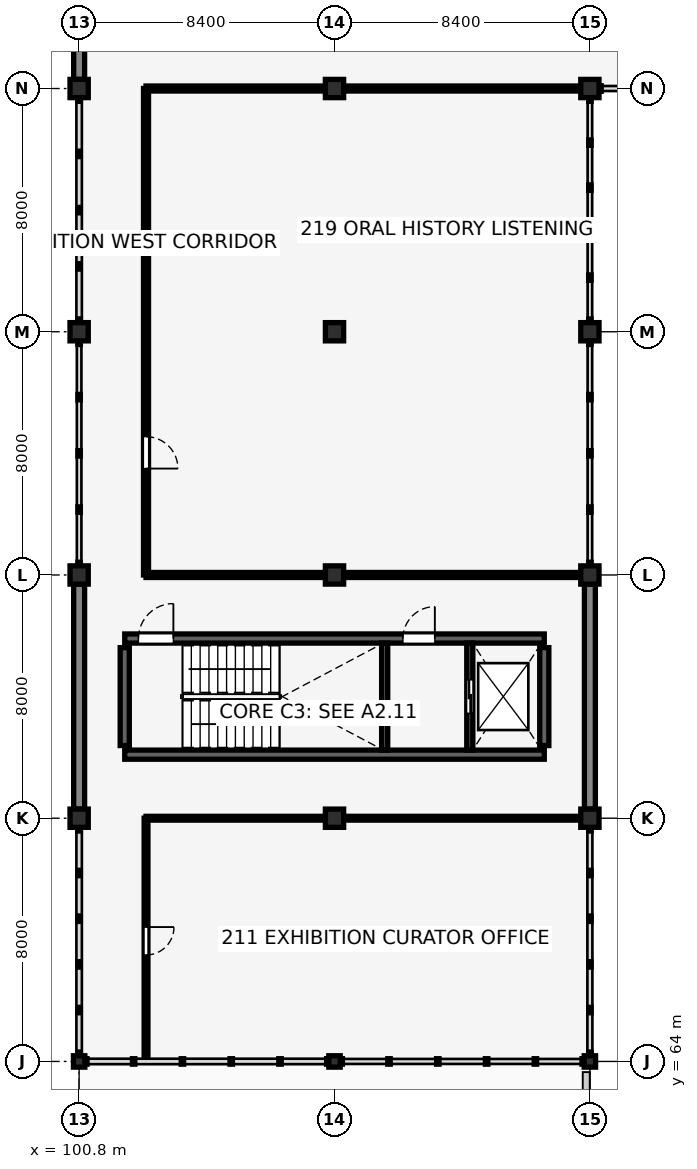
"""IFC4 building model, lengths in metres.
Left out: names, types, materials, properties, quantities, classifications, styles, units other than length and angle.
Written with IfcOpenShell. Run it as: python <this file> out.ifc"""

import sys

from ifc_helpers import new_model, si_unit, direction, frame, frame_2d, origin, origin_2d, place, context, subcontext, project, spatial, rectangle, i_section, extrude, element, fill, save


model = new_model("IFC4")
c1 = context("Model", 3, precision=1e-05, world=origin(), true_north=direction((0.0, 1.0)))
c2 = subcontext(c1, "Body", "Model", "MODEL_VIEW")
j1 = project(units=[si_unit("LENGTHUNIT", "METRE"), si_unit("PLANEANGLEUNIT", "RADIAN")], contexts=[c1])
p1 = place(None, origin())
s1 = spatial("IfcSite", under=j1, at=p1, CompositionType="ELEMENT")
p2 = place(p1, origin())
s2 = spatial("IfcBuilding", under=s1, at=p2, CompositionType="ELEMENT")
p3 = place(p2, frame((0.0, 0.0, 9.52)))
s3 = spatial("IfcBuildingStorey", under=s2, at=p3, CompositionType="ELEMENT", Elevation=9.52)
p4 = place(p3, frame((102.3, 74.09, 0.0), z_axis=(0.0, 0.0, 1.0), x_axis=(1.0, 0.0, 0.0)))
e1 = element("IfcWall", 1, at=p4, inside=s3, PredefinedType="SHEAR", context=c2, shape_type="SweptSolid", body=[
    extrude(rectangle(XDim=13.8, YDim=0.3, at=frame_2d((6.9, 0.0))), origin(), (0.0, 0.0, 1.0), 3.57),
])
p5 = place(p3, frame((102.3, 77.91, 0.0), z_axis=(0.0, 0.0, 1.0), x_axis=(1.0, 0.0, 0.0)))
e2 = element("IfcWall", 2, at=p5, inside=s3, PredefinedType="SHEAR", context=c2, shape_type="SweptSolid", body=[
    extrude(rectangle(XDim=13.8, YDim=0.3, at=frame_2d((6.9, 0.0))), origin(), (0.0, 0.0, 1.0), 3.57),
])
p6 = place(p5, frame((0.45, 0.0, 0.0), z_axis=(0.0, 0.0, 1.0), x_axis=(1.0, 0.0, 0.0)))
e3 = element("IfcOpeningElement", 3, at=p6, cuts=e2, PredefinedType="OPENING", context=c2, shape_type="SweptSolid", body=[
    extrude(rectangle(XDim=1.15, YDim=2.15, at=frame_2d((0.575, 1.075))), frame((0.0, 0.16, 0.0), z_axis=(0.0, -1.0, 0.0), x_axis=(1.0, 0.0, 0.0)), (0.0, 0.0, 1.0), 0.32),
])
p7 = place(p5, frame((9.15, 0.0, 0.0), z_axis=(0.0, 0.0, 1.0), x_axis=(1.0, 0.0, 0.0)))
e4 = element("IfcOpeningElement", 4, at=p7, cuts=e2, PredefinedType="OPENING", context=c2, shape_type="SweptSolid", body=[
    extrude(rectangle(XDim=1.05, YDim=2.15, at=frame_2d((0.525, 1.075))), frame((0.0, 0.16, 0.0), z_axis=(0.0, -1.0, 0.0), x_axis=(1.0, 0.0, 0.0)), (0.0, 0.0, 1.0), 0.32),
])
for number, where, z_axis, x_axis in (
    (5, (102.3, 74.39, 0.0), (0.0, 0.0, 1.0), (0.0, 1.0, 0.0)),
    (6, (116.1, 74.39, 0.0), (0.0, 0.0, 1.0), (0.0, 1.0, 0.0)),
):
    element("IfcWall", number, at=place(p3, frame(where, z_axis=z_axis, x_axis=x_axis)), inside=s3, PredefinedType="SHEAR", context=c2, shape_type="SweptSolid", body=[
        extrude(rectangle(XDim=3.22, YDim=0.3, at=frame_2d((1.61, 0.0))), origin(), (0.0, 0.0, 1.0), 3.57),
    ])
p8 = place(p3, frame((100.8, 64.0, 0.0), z_axis=(0.0, 0.0, 1.0), x_axis=(1.0, 0.0, 0.0)))
e7 = element("IfcColumn", 7, at=p8, inside=s3, PredefinedType="COLUMN", context=c2, shape_type="SweptSolid", body=[
    extrude(i_section(OverallWidth=0.375, OverallDepth=0.375, WebThickness=0.017, FlangeThickness=0.027, FilletRadius=0.015, at=origin_2d()), origin(), (0.0, 0.0, 1.0), 3.57),
])
for number, where, z_axis, x_axis in (
    (8, (100.8, 72.0, 0.0), (0.0, 0.0, 1.0), (1.0, 0.0, 0.0)),
    (9, (100.8, 80.0, 0.0), (0.0, 0.0, 1.0), (1.0, 0.0, 0.0)),
    (10, (100.8, 88.0, 0.0), (0.0, 0.0, 1.0), (1.0, 0.0, 0.0)),
    (11, (100.8, 96.0, 0.0), (0.0, 0.0, 1.0), (1.0, 0.0, 0.0)),
):
    element("IfcColumn", number, at=place(p3, frame(where, z_axis=z_axis, x_axis=x_axis)), inside=s3, PredefinedType="COLUMN", context=c2, shape_type="SweptSolid", body=[
        extrude(rectangle(XDim=0.6, YDim=0.6, at=origin_2d()), origin(), (0.0, 0.0, 1.0), 3.57),
    ])
p9 = place(p3, frame((109.2, 64.0, 0.0), z_axis=(0.0, 0.0, 1.0), x_axis=(1.0, 0.0, 0.0)))
e12 = element("IfcColumn", 12, at=p9, inside=s3, PredefinedType="COLUMN", context=c2, shape_type="SweptSolid", body=[
    extrude(i_section(OverallWidth=0.375, OverallDepth=0.375, WebThickness=0.017, FlangeThickness=0.027, FilletRadius=0.015, at=origin_2d()), origin(), (0.0, 0.0, 1.0), 3.57),
])
for number, where, z_axis, x_axis in (
    (13, (109.2, 72.0, 0.0), (0.0, 0.0, 1.0), (1.0, 0.0, 0.0)),
    (14, (109.2, 80.0, 0.0), (0.0, 0.0, 1.0), (1.0, 0.0, 0.0)),
    (15, (109.2, 88.0, 0.0), (0.0, 0.0, 1.0), (1.0, 0.0, 0.0)),
    (16, (109.2, 96.0, 0.0), (0.0, 0.0, 1.0), (1.0, 0.0, 0.0)),
):
    element("IfcColumn", number, at=place(p3, frame(where, z_axis=z_axis, x_axis=x_axis)), inside=s3, PredefinedType="COLUMN", context=c2, shape_type="SweptSolid", body=[
        extrude(rectangle(XDim=0.6, YDim=0.6, at=origin_2d()), origin(), (0.0, 0.0, 1.0), 3.57),
    ])
p10 = place(p3, frame((117.6, 64.0, 0.0), z_axis=(0.0, 0.0, 1.0), x_axis=(1.0, 0.0, 0.0)))
e17 = element("IfcColumn", 17, at=p10, inside=s3, PredefinedType="COLUMN", context=c2, shape_type="SweptSolid", body=[
    extrude(i_section(OverallWidth=0.375, OverallDepth=0.375, WebThickness=0.017, FlangeThickness=0.027, FilletRadius=0.015, at=origin_2d()), origin(), (0.0, 0.0, 1.0), 3.57),
])
for number, where, z_axis, x_axis in (
    (18, (117.6, 72.0, 0.0), (0.0, 0.0, 1.0), (1.0, 0.0, 0.0)),
    (19, (117.6, 80.0, 0.0), (0.0, 0.0, 1.0), (1.0, 0.0, 0.0)),
    (20, (117.6, 88.0, 0.0), (0.0, 0.0, 1.0), (1.0, 0.0, 0.0)),
    (21, (117.6, 96.0, 0.0), (0.0, 0.0, 1.0), (1.0, 0.0, 0.0)),
):
    element("IfcColumn", number, at=place(p3, frame(where, z_axis=z_axis, x_axis=x_axis)), inside=s3, PredefinedType="COLUMN", context=c2, shape_type="SweptSolid", body=[
        extrude(rectangle(XDim=0.6, YDim=0.6, at=origin_2d()), origin(), (0.0, 0.0, 1.0), 3.57),
    ])
for number, where, z_axis, x_axis in (
    (22, (117.6, 72.3, 0.0), (0.0, 0.0, 1.0), (0.0, 1.0, 0.0)),
    (23, (100.8, 72.3, 0.0), (0.0, 0.0, 1.0), (0.0, 1.0, 0.0)),
):
    element("IfcWall", number, at=place(p3, frame(where, z_axis=z_axis, x_axis=x_axis)), inside=s3, PredefinedType="SOLIDWALL", context=c2, shape_type="SweptSolid", body=[
        extrude(rectangle(XDim=7.4, YDim=0.36, at=frame_2d((3.7, 0.0))), origin(), (0.0, 0.0, 1.0), 3.27),
    ])
p11 = place(p3, frame((100.8, 96.3, 0.0), z_axis=(0.0, 0.0, 1.0), x_axis=(0.0, 1.0, 0.0)))
e24 = element("IfcWall", 24, at=p11, inside=s3, PredefinedType="SOLIDWALL", context=c2, shape_type="SweptSolid", body=[
    extrude(rectangle(XDim=7.513, YDim=0.36, at=frame_2d((3.756, 0.0))), origin(), (0.0, 0.0, 1.0), 3.219),
])
p12 = place(p11, frame((2.756, 0.0, 0.9), z_axis=(0.0, 0.0, 1.0), x_axis=(1.0, 0.0, 0.0)))
e25 = element("IfcOpeningElement", 25, at=p12, cuts=e24, PredefinedType="OPENING", context=c2, shape_type="SweptSolid", body=[
    extrude(rectangle(XDim=2.0, YDim=1.5, at=frame_2d((1.0, 0.75))), frame((0.0, 0.19, 0.0), z_axis=(0.0, -1.0, 0.0), x_axis=(1.0, 0.0, 0.0)), (0.0, 0.0, 1.0), 0.38),
])
p13 = place(p3, frame((117.48, 63.65, 0.0), z_axis=(0.0, 0.0, 1.0), x_axis=(0.0, -1.0, 0.0)))
e26 = element("IfcWall", 26, at=p13, inside=s3, PredefinedType="PARAPET", context=c2, shape_type="SweptSolid", body=[
    extrude(rectangle(XDim=7.65, YDim=0.23, at=frame_2d((3.825, 0.0))), origin(), (0.0, 0.0, 1.0), 1.05),
])
p14 = place(p3, frame((110.85, 74.24, 0.0), z_axis=(0.0, 0.0, 1.0), x_axis=(0.0, 1.0, 0.0)))
e27 = element("IfcWall", 27, at=p14, inside=s3, PredefinedType="SHEAR", context=c2, shape_type="SweptSolid", body=[
    extrude(rectangle(XDim=3.52, YDim=0.2, at=frame_2d((1.76, 0.0))), origin(), (0.0, 0.0, 1.0), 3.57),
])
p15 = place(p3, frame((113.65, 74.24, 0.0), z_axis=(0.0, 0.0, 1.0), x_axis=(0.0, 1.0, 0.0)))
e28 = element("IfcWall", 28, at=p15, inside=s3, PredefinedType="SHEAR", context=c2, shape_type="SweptSolid", body=[
    extrude(rectangle(XDim=3.52, YDim=0.2, at=frame_2d((1.76, 0.0))), origin(), (0.0, 0.0, 1.0), 3.57),
])
p16 = place(p15, frame((1.21, 0.0, 0.0), z_axis=(0.0, 0.0, 1.0), x_axis=(1.0, 0.0, 0.0)))
e29 = element("IfcOpeningElement", 29, at=p16, cuts=e28, PredefinedType="OPENING", context=c2, shape_type="SweptSolid", body=[
    extrude(rectangle(XDim=1.1, YDim=2.15, at=frame_2d((0.55, 1.075))), frame((0.0, 0.11, 0.0), z_axis=(0.0, -1.0, 0.0), x_axis=(1.0, 0.0, 0.0)), (0.0, 0.0, 1.0), 0.22),
])
p17 = place(p3, frame((103.0, 64.04, 0.0), z_axis=(0.0, 0.0, 1.0), x_axis=(0.0, 1.0, 0.0)))
e30 = element("IfcWall", 30, at=p17, inside=s3, PredefinedType="PARTITIONING", context=c2, shape_type="SweptSolid", body=[
    extrude(rectangle(XDim=7.96, YDim=0.125, at=frame_2d((3.98, 0.0))), origin(), (0.0, 0.0, 1.0), 3.57),
])
p18 = place(p17, frame((4.38, 0.0, 0.0), z_axis=(0.0, 0.0, 1.0), x_axis=(-1.0, 0.0, 0.0)))
e31 = element("IfcOpeningElement", 31, at=p18, cuts=e30, PredefinedType="OPENING", context=c2, shape_type="SweptSolid", body=[
    extrude(rectangle(XDim=0.92, YDim=2.12, at=frame_2d((0.46, 1.06))), frame((0.0, 0.073, 0.0), z_axis=(0.0, -1.0, 0.0), x_axis=(1.0, 0.0, 0.0)), (0.0, 0.0, 1.0), 0.145),
])
p19 = place(p3, frame((103.0, 80.0, 0.0), z_axis=(0.0, 0.0, 1.0), x_axis=(0.0, 1.0, 0.0)))
e32 = element("IfcWall", 32, at=p19, inside=s3, PredefinedType="PARTITIONING", context=c2, shape_type="SweptSolid", body=[
    extrude(rectangle(XDim=16.0, YDim=0.165, at=frame_2d((8.0, 0.0))), origin(), (0.0, 0.0, 1.0), 3.57),
])
p20 = place(p19, frame((4.55, 0.0, 0.0), z_axis=(0.0, 0.0, 1.0), x_axis=(-1.0, 0.0, 0.0)))
e33 = element("IfcOpeningElement", 33, at=p20, cuts=e32, PredefinedType="OPENING", context=c2, shape_type="SweptSolid", body=[
    extrude(rectangle(XDim=1.05, YDim=2.15, at=frame_2d((0.525, 1.075))), frame((0.0, 0.093, 0.0), z_axis=(0.0, -1.0, 0.0), x_axis=(1.0, 0.0, 0.0)), (0.0, 0.0, 1.0), 0.185),
])
p21 = place(p3, frame((103.0, 72.0, 0.0), z_axis=(0.0, 0.0, 1.0), x_axis=(1.0, 0.0, 0.0)))
e34 = element("IfcWall", 34, at=p21, inside=s3, PredefinedType="PARTITIONING", context=c2, shape_type="SweptSolid", body=[
    extrude(rectangle(XDim=5.91, YDim=0.125, at=frame_2d((2.955, 0.0))), origin(), (0.0, 0.0, 1.0), 3.037),
])
p22 = place(p3, frame((109.49, 72.0, 0.0), z_axis=(0.0, 0.0, 1.0), x_axis=(1.0, 0.0, 0.0)))
e35 = element("IfcWall", 35, at=p22, inside=s3, PredefinedType="PARTITIONING", context=c2, shape_type="SweptSolid", body=[
    extrude(rectangle(XDim=7.82, YDim=0.125, at=frame_2d((3.91, 0.0))), origin(), (0.0, 0.0, 1.0), 3.037),
])
p23 = place(p3, frame((103.0, 80.0, 0.0), z_axis=(0.0, 0.0, 1.0), x_axis=(1.0, 0.0, 0.0)))
e36 = element("IfcWall", 36, at=p23, inside=s3, PredefinedType="PARTITIONING", context=c2, shape_type="SweptSolid", body=[
    extrude(rectangle(XDim=5.91, YDim=0.165, at=frame_2d((2.955, 0.0))), origin(), (0.0, 0.0, 1.0), 3.037),
])
p24 = place(p3, frame((109.49, 80.0, 0.0), z_axis=(0.0, 0.0, 1.0), x_axis=(1.0, 0.0, 0.0)))
e37 = element("IfcWall", 37, at=p24, inside=s3, PredefinedType="PARTITIONING", context=c2, shape_type="SweptSolid", body=[
    extrude(rectangle(XDim=7.82, YDim=0.165, at=frame_2d((3.91, 0.0))), origin(), (0.0, 0.0, 1.0), 3.037),
])
p25 = place(p3, frame((103.0, 96.0, 0.0), z_axis=(0.0, 0.0, 1.0), x_axis=(1.0, 0.0, 0.0)))
e38 = element("IfcWall", 38, at=p25, inside=s3, PredefinedType="PARTITIONING", context=c2, shape_type="SweptSolid", body=[
    extrude(rectangle(XDim=5.91, YDim=0.165, at=frame_2d((2.955, 0.0))), origin(), (0.0, 0.0, 1.0), 3.037),
])
p26 = place(p3, frame((109.49, 96.0, 0.0), z_axis=(0.0, 0.0, 1.0), x_axis=(1.0, 0.0, 0.0)))
e39 = element("IfcWall", 39, at=p26, inside=s3, PredefinedType="PARTITIONING", context=c2, shape_type="SweptSolid", body=[
    extrude(rectangle(XDim=7.82, YDim=0.165, at=frame_2d((3.91, 0.0))), origin(), (0.0, 0.0, 1.0), 3.037),
])
p27 = place(p6, origin())
e40 = element("IfcDoor", 40, at=p27, inside=s3, OperationType="SINGLE_SWING_RIGHT", PredefinedType="DOOR", context=c2, shape_type="SweptSolid", body=[
    extrude(rectangle(XDim=1.15, YDim=2.15, at=frame_2d((0.575, 1.075))), frame((0.0, 0.025, 0.0), z_axis=(0.0, -1.0, 0.0), x_axis=(1.0, 0.0, 0.0)), (0.0, 0.0, 1.0), 0.05),
])
fill(e3, e40)
p28 = place(p7, origin())
e41 = element("IfcDoor", 41, at=p28, inside=s3, OperationType="SINGLE_SWING_RIGHT", PredefinedType="DOOR", context=c2, shape_type="SweptSolid", body=[
    extrude(rectangle(XDim=1.05, YDim=2.15, at=frame_2d((0.525, 1.075))), frame((0.0, 0.025, 0.0), z_axis=(0.0, -1.0, 0.0), x_axis=(1.0, 0.0, 0.0)), (0.0, 0.0, 1.0), 0.05),
])
fill(e4, e41)
p29 = place(p16, origin())
e42 = element("IfcDoor", 42, at=p29, inside=s3, OperationType="DOUBLE_DOOR_SLIDING", PredefinedType="DOOR", context=c2, shape_type="SweptSolid", body=[
    extrude(rectangle(XDim=1.1, YDim=2.15, at=frame_2d((0.55, 1.075))), frame((0.0, 0.025, 0.0), z_axis=(0.0, -1.0, 0.0), x_axis=(1.0, 0.0, 0.0)), (0.0, 0.0, 1.0), 0.05),
])
fill(e29, e42)
p30 = place(p18, origin())
e43 = element("IfcDoor", 43, at=p30, inside=s3, OperationType="SINGLE_SWING_LEFT", PredefinedType="DOOR", context=c2, shape_type="SweptSolid", body=[
    extrude(rectangle(XDim=0.92, YDim=2.12, at=frame_2d((0.46, 1.06))), frame((0.0, 0.025, 0.0), z_axis=(0.0, -1.0, 0.0), x_axis=(1.0, 0.0, 0.0)), (0.0, 0.0, 1.0), 0.05),
])
fill(e31, e43)
p31 = place(p20, origin())
e44 = element("IfcDoor", 44, at=p31, inside=s3, OperationType="SINGLE_SWING_RIGHT", PredefinedType="DOOR", context=c2, shape_type="SweptSolid", body=[
    extrude(rectangle(XDim=1.05, YDim=2.15, at=frame_2d((0.525, 1.075))), frame((0.0, 0.025, 0.0), z_axis=(0.0, -1.0, 0.0), x_axis=(1.0, 0.0, 0.0)), (0.0, 0.0, 1.0), 0.05),
])
fill(e33, e44)
save(model, sys.argv[1])
